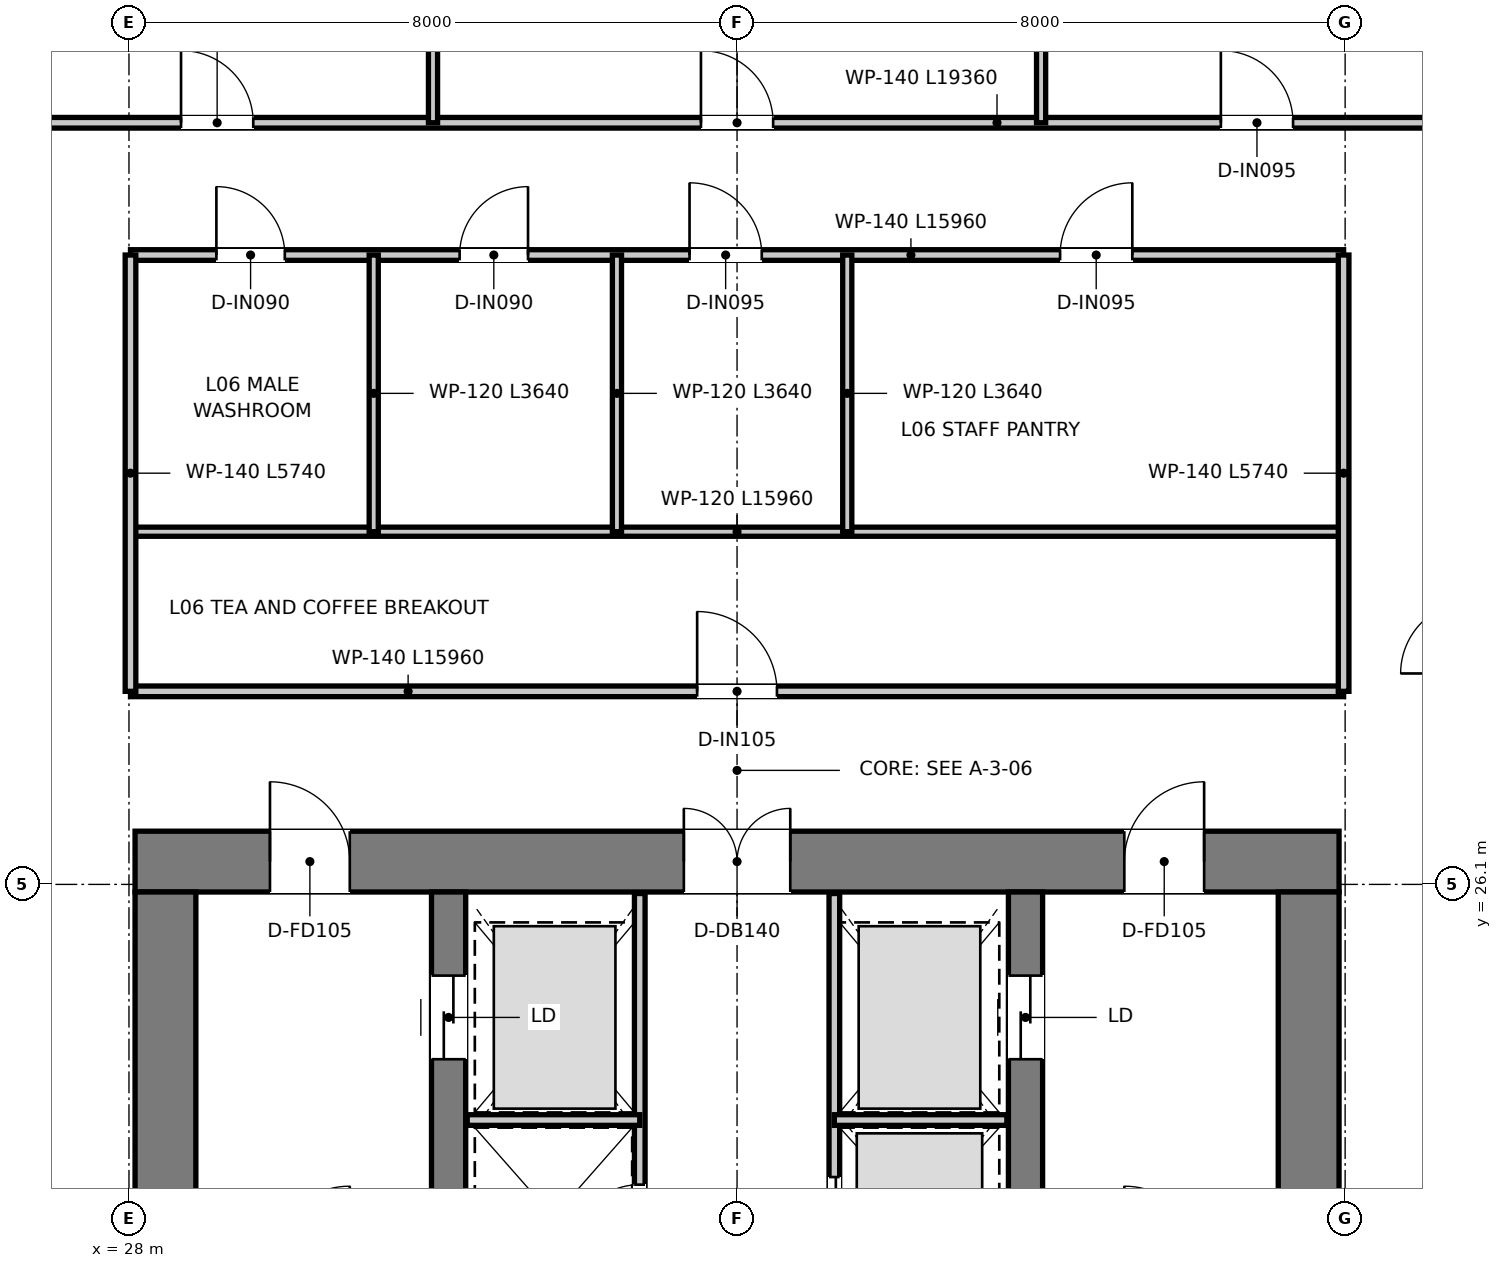
"""IFC4 building model, lengths in metres.
Left out: names, types, materials, properties, quantities, classifications, styles, units other than length and angle.
Written with IfcOpenShell. Run it as: python <this file> out.ifc"""

import sys

from ifc_helpers import new_model, si_unit, direction, frame, frame_2d, origin, place, context, subcontext, project, spatial, rectangle, extrude, element, fill, save


model = new_model("IFC4")
c1 = context("Model", 3, precision=1e-05, world=origin(), true_north=direction((0.0, 1.0)))
c2 = subcontext(c1, "Body", "Model", "MODEL_VIEW")
j1 = project(units=[si_unit("LENGTHUNIT", "METRE"), si_unit("PLANEANGLEUNIT", "RADIAN")], contexts=[c1])
p1 = place(None, origin())
s1 = spatial("IfcSite", under=j1, at=p1, CompositionType="ELEMENT")
p2 = place(p1, origin())
s2 = spatial("IfcBuilding", under=s1, at=p2, CompositionType="ELEMENT")
p3 = place(p2, frame((0.0, 0.0, 28.95)))
s3 = spatial("IfcBuildingStorey", under=s2, at=p3, CompositionType="ELEMENT", Elevation=28.95)
p4 = place(p3, frame((28.08, 26.4, 0.0), z_axis=(0.0, 0.0, 1.0), x_axis=(1.0, 0.0, 0.0)))
e1 = element("IfcWall", 1, at=p4, inside=s3, PredefinedType="SHEAR", context=c2, shape_type="SweptSolid", body=[
    extrude(rectangle(XDim=15.84, YDim=0.8, at=frame_2d((7.92, 0.0))), origin(), (0.0, 0.0, 1.0), 3.95),
])
p5 = place(p4, frame((7.22, 0.0, 0.0)))
e2 = element("IfcOpeningElement", 2, at=p5, cuts=e1, PredefinedType="OPENING", context=c2, shape_type="SweptSolid", body=[
    extrude(rectangle(XDim=1.4, YDim=2.2, at=frame_2d((0.7, 1.1))), frame((0.0, 0.41, 0.0), z_axis=(0.0, -1.0, 0.0), x_axis=(1.0, 0.0, 0.0)), (0.0, 0.0, 1.0), 0.82),
])
p6 = place(p4, frame((1.775, 0.0, 0.0)))
e3 = element("IfcOpeningElement", 3, at=p6, cuts=e1, PredefinedType="OPENING", context=c2, shape_type="SweptSolid", body=[
    extrude(rectangle(XDim=1.05, YDim=2.1, at=frame_2d((0.525, 1.05))), frame((0.0, 0.41, 0.0), z_axis=(0.0, -1.0, 0.0), x_axis=(1.0, 0.0, 0.0)), (0.0, 0.0, 1.0), 0.82),
])
p7 = place(p4, frame((13.015, 0.0, 0.0)))
e4 = element("IfcOpeningElement", 4, at=p7, cuts=e1, PredefinedType="OPENING", context=c2, shape_type="SweptSolid", body=[
    extrude(rectangle(XDim=1.05, YDim=2.1, at=frame_2d((0.525, 1.05))), frame((0.0, 0.41, 0.0), z_axis=(0.0, -1.0, 0.0), x_axis=(1.0, 0.0, 0.0)), (0.0, 0.0, 1.0), 0.82),
])
for number, where, z_axis, x_axis in (
    (5, (28.48, 11.3, 0.0), (0.0, 0.0, 1.0), (0.0, 1.0, 0.0)),
    (6, (43.52, 11.3, 0.0), (0.0, 0.0, 1.0), (0.0, 1.0, 0.0)),
):
    element("IfcWall", number, at=place(p3, frame(where, z_axis=z_axis, x_axis=x_axis)), inside=s3, PredefinedType="SHEAR", context=c2, shape_type="SweptSolid", body=[
        extrude(rectangle(XDim=14.7, YDim=0.8, at=frame_2d((7.35, 0.0))), origin(), (0.0, 0.0, 1.0), 3.95),
    ])
p8 = place(p3, frame((32.205, 13.22, 0.0), z_axis=(0.0, 0.0, 1.0), x_axis=(0.0, 1.0, 0.0)))
e7 = element("IfcWall", 7, at=p8, inside=s3, PredefinedType="SHEAR", context=c2, shape_type="SweptSolid", body=[
    extrude(rectangle(XDim=12.78, YDim=0.45, at=frame_2d((6.39, 0.0))), origin(), (0.0, 0.0, 1.0), 3.95),
])
p9 = place(p8, frame((10.58, 0.0, 0.0)))
e8 = element("IfcOpeningElement", 8, at=p9, cuts=e7, PredefinedType="OPENING", context=c2, shape_type="SweptSolid", body=[
    extrude(rectangle(XDim=1.1, YDim=2.15, at=frame_2d((0.55, 1.075))), frame((0.0, 0.235, 0.0), z_axis=(0.0, -1.0, 0.0), x_axis=(1.0, 0.0, 0.0)), (0.0, 0.0, 1.0), 0.47),
])
p10 = place(p3, frame((39.795, 13.22, 0.0), z_axis=(0.0, 0.0, 1.0), x_axis=(0.0, 1.0, 0.0)))
e9 = element("IfcWall", 9, at=p10, inside=s3, PredefinedType="SHEAR", context=c2, shape_type="SweptSolid", body=[
    extrude(rectangle(XDim=12.78, YDim=0.45, at=frame_2d((6.39, 0.0))), origin(), (0.0, 0.0, 1.0), 3.95),
])
p11 = place(p10, frame((10.58, 0.0, 0.0)))
e10 = element("IfcOpeningElement", 10, at=p11, cuts=e9, PredefinedType="OPENING", context=c2, shape_type="SweptSolid", body=[
    extrude(rectangle(XDim=1.1, YDim=2.15, at=frame_2d((0.55, 1.075))), frame((0.0, 0.235, 0.0), z_axis=(0.0, -1.0, 0.0), x_axis=(1.0, 0.0, 0.0)), (0.0, 0.0, 1.0), 0.47),
])
p12 = place(p3, frame((34.72, 20.2, 0.0), z_axis=(0.0, 0.0, 1.0), x_axis=(0.0, 1.0, 0.0)))
e11 = element("IfcWall", 11, at=p12, inside=s3, PredefinedType="PARTITIONING", context=c2, shape_type="SweptSolid", body=[
    extrude(rectangle(XDim=5.78, YDim=0.14, at=frame_2d((2.89, 0.0))), origin(), (0.0, 0.0, 1.0), 2.47),
])
p13 = place(p12, frame((1.05, 0.0, 0.0)))
e12 = element("IfcOpeningElement", 12, at=p13, cuts=e11, PredefinedType="OPENING", context=c2, shape_type="SweptSolid", body=[
    extrude(rectangle(XDim=0.9, YDim=2.1, at=frame_2d((0.45, 1.05))), frame((0.0, 0.08, 0.0), z_axis=(0.0, -1.0, 0.0), x_axis=(1.0, 0.0, 0.0)), (0.0, 0.0, 1.0), 0.16),
])
p14 = place(p3, frame((37.28, 20.2, 0.0), z_axis=(0.0, 0.0, 1.0), x_axis=(0.0, 1.0, 0.0)))
e13 = element("IfcWall", 13, at=p14, inside=s3, PredefinedType="PARTITIONING", context=c2, shape_type="SweptSolid", body=[
    extrude(rectangle(XDim=5.78, YDim=0.14, at=frame_2d((2.89, 0.0))), origin(), (0.0, 0.0, 1.0), 2.47),
])
p15 = place(p14, frame((0.95, 0.0, 0.0)))
e14 = element("IfcOpeningElement", 14, at=p15, cuts=e13, PredefinedType="OPENING", context=c2, shape_type="SweptSolid", body=[
    extrude(rectangle(XDim=1.1, YDim=2.15, at=frame_2d((0.55, 1.075))), frame((0.0, 0.08, 0.0), z_axis=(0.0, -1.0, 0.0), x_axis=(1.0, 0.0, 0.0)), (0.0, 0.0, 1.0), 0.16),
])
for number, where, z_axis, x_axis in (
    (15, (32.45, 23.0, 0.0), (0.0, 0.0, 1.0), (1.0, 0.0, 0.0)),
    (16, (37.28, 23.0, 0.0), (0.0, 0.0, 1.0), (1.0, 0.0, 0.0)),
):
    element("IfcWall", number, at=place(p3, frame(where, z_axis=z_axis, x_axis=x_axis)), inside=s3, PredefinedType="PARTITIONING", context=c2, shape_type="SweptSolid", body=[
        extrude(rectangle(XDim=2.27, YDim=0.14, at=frame_2d((1.135, 0.0))), origin(), (0.0, 0.0, 1.0), 2.47),
    ])
p16 = place(p3, frame((28.02, 28.64, 0.0), z_axis=(0.0, 0.0, 1.0), x_axis=(1.0, 0.0, 0.0)))
e17 = element("IfcWall", 17, at=p16, inside=s3, PredefinedType="PARTITIONING", context=c2, shape_type="SweptSolid", body=[
    extrude(rectangle(XDim=15.96, YDim=0.14, at=frame_2d((7.98, 0.0))), origin(), (0.0, 0.0, 1.0), 3.08),
])
p17 = place(p16, frame((7.455, 0.0, 0.0)))
e18 = element("IfcOpeningElement", 18, at=p17, cuts=e17, PredefinedType="OPENING", context=c2, shape_type="SweptSolid", body=[
    extrude(rectangle(XDim=1.05, YDim=2.15, at=frame_2d((0.525, 1.075))), frame((0.0, 0.08, 0.0), z_axis=(0.0, -1.0, 0.0), x_axis=(1.0, 0.0, 0.0)), (0.0, 0.0, 1.0), 0.16),
])
p18 = place(p3, frame((28.02, 30.74, 0.0), z_axis=(0.0, 0.0, 1.0), x_axis=(1.0, 0.0, 0.0)))
e19 = element("IfcWall", 19, at=p18, inside=s3, PredefinedType="PARTITIONING", context=c2, shape_type="SweptSolid", body=[
    extrude(rectangle(XDim=15.96, YDim=0.12, at=frame_2d((7.98, 0.0))), origin(), (0.0, 0.0, 1.0), 3.08),
])
p19 = place(p3, frame((28.02, 34.38, 0.0), z_axis=(0.0, 0.0, 1.0), x_axis=(1.0, 0.0, 0.0)))
e20 = element("IfcWall", 20, at=p19, inside=s3, PredefinedType="PARTITIONING", context=c2, shape_type="SweptSolid", body=[
    extrude(rectangle(XDim=15.96, YDim=0.14, at=frame_2d((7.98, 0.0))), origin(), (0.0, 0.0, 1.0), 3.08),
])
p20 = place(p19, frame((1.13, 0.0, 0.0)))
e21 = element("IfcOpeningElement", 21, at=p20, cuts=e20, PredefinedType="OPENING", context=c2, shape_type="SweptSolid", body=[
    extrude(rectangle(XDim=0.9, YDim=2.1, at=frame_2d((0.45, 1.05))), frame((0.0, 0.08, 0.0), z_axis=(0.0, -1.0, 0.0), x_axis=(1.0, 0.0, 0.0)), (0.0, 0.0, 1.0), 0.16),
])
p21 = place(p19, frame((4.33, 0.0, 0.0)))
e22 = element("IfcOpeningElement", 22, at=p21, cuts=e20, PredefinedType="OPENING", context=c2, shape_type="SweptSolid", body=[
    extrude(rectangle(XDim=0.9, YDim=2.1, at=frame_2d((0.45, 1.05))), frame((0.0, 0.08, 0.0), z_axis=(0.0, -1.0, 0.0), x_axis=(1.0, 0.0, 0.0)), (0.0, 0.0, 1.0), 0.16),
])
p22 = place(p19, frame((7.355, 0.0, 0.0)))
e23 = element("IfcOpeningElement", 23, at=p22, cuts=e20, PredefinedType="OPENING", context=c2, shape_type="SweptSolid", body=[
    extrude(rectangle(XDim=0.95, YDim=2.1, at=frame_2d((0.475, 1.05))), frame((0.0, 0.08, 0.0), z_axis=(0.0, -1.0, 0.0), x_axis=(1.0, 0.0, 0.0)), (0.0, 0.0, 1.0), 0.16),
])
p23 = place(p19, frame((12.23, 0.0, 0.0)))
e24 = element("IfcOpeningElement", 24, at=p23, cuts=e20, PredefinedType="OPENING", context=c2, shape_type="SweptSolid", body=[
    extrude(rectangle(XDim=0.95, YDim=2.1, at=frame_2d((0.475, 1.05))), frame((0.0, 0.08, 0.0), z_axis=(0.0, -1.0, 0.0), x_axis=(1.0, 0.0, 0.0)), (0.0, 0.0, 1.0), 0.16),
])
for number, where, z_axis, x_axis in (
    (25, (28.02, 28.64, 0.0), (0.0, 0.0, 1.0), (0.0, 1.0, 0.0)),
    (26, (43.98, 28.64, 0.0), (0.0, 0.0, 1.0), (0.0, 1.0, 0.0)),
):
    element("IfcWall", number, at=place(p3, frame(where, z_axis=z_axis, x_axis=x_axis)), inside=s3, PredefinedType="PARTITIONING", context=c2, shape_type="SweptSolid", body=[
        extrude(rectangle(XDim=5.74, YDim=0.14, at=frame_2d((2.87, 0.0))), origin(), (0.0, 0.0, 1.0), 3.22),
    ])
for number, where, z_axis, x_axis in (
    (27, (31.22, 30.74, 0.0), (0.0, 0.0, 1.0), (0.0, 1.0, 0.0)),
    (28, (34.42, 30.74, 0.0), (0.0, 0.0, 1.0), (0.0, 1.0, 0.0)),
    (29, (37.45, 30.74, 0.0), (0.0, 0.0, 1.0), (0.0, 1.0, 0.0)),
):
    element("IfcWall", number, at=place(p3, frame(where, z_axis=z_axis, x_axis=x_axis)), inside=s3, PredefinedType="PARTITIONING", context=c2, shape_type="SweptSolid", body=[
        extrude(rectangle(XDim=3.64, YDim=0.12, at=frame_2d((1.82, 0.0))), origin(), (0.0, 0.0, 1.0), 3.12),
    ])
p24 = place(p3, frame((26.32, 36.12, 0.0), z_axis=(0.0, 0.0, 1.0), x_axis=(1.0, 0.0, 0.0)))
e30 = element("IfcWall", 30, at=p24, inside=s3, PredefinedType="PARTITIONING", context=c2, shape_type="SweptSolid", body=[
    extrude(rectangle(XDim=19.36, YDim=0.14, at=frame_2d((9.68, 0.0))), origin(), (0.0, 0.0, 1.0), 3.08),
])
p25 = place(p24, frame((2.365, 0.0, 0.0)))
e31 = element("IfcOpeningElement", 31, at=p25, cuts=e30, PredefinedType="OPENING", context=c2, shape_type="SweptSolid", body=[
    extrude(rectangle(XDim=0.95, YDim=2.1, at=frame_2d((0.475, 1.05))), frame((0.0, 0.08, 0.0), z_axis=(0.0, -1.0, 0.0), x_axis=(1.0, 0.0, 0.0)), (0.0, 0.0, 1.0), 0.16),
])
p26 = place(p24, frame((9.205, 0.0, 0.0)))
e32 = element("IfcOpeningElement", 32, at=p26, cuts=e30, PredefinedType="OPENING", context=c2, shape_type="SweptSolid", body=[
    extrude(rectangle(XDim=0.95, YDim=2.1, at=frame_2d((0.475, 1.05))), frame((0.0, 0.08, 0.0), z_axis=(0.0, -1.0, 0.0), x_axis=(1.0, 0.0, 0.0)), (0.0, 0.0, 1.0), 0.16),
])
p27 = place(p24, frame((16.045, 0.0, 0.0)))
e33 = element("IfcOpeningElement", 33, at=p27, cuts=e30, PredefinedType="OPENING", context=c2, shape_type="SweptSolid", body=[
    extrude(rectangle(XDim=0.95, YDim=2.1, at=frame_2d((0.475, 1.05))), frame((0.0, 0.08, 0.0), z_axis=(0.0, -1.0, 0.0), x_axis=(1.0, 0.0, 0.0)), (0.0, 0.0, 1.0), 0.16),
])
for number, where, z_axis, x_axis in (
    (34, (32.0, 36.12, 0.0), (0.0, 0.0, 1.0), (0.0, 1.0, 0.0)),
    (35, (40.0, 36.12, 0.0), (0.0, 0.0, 1.0), (0.0, 1.0, 0.0)),
):
    element("IfcWall", number, at=place(p3, frame(where, z_axis=z_axis, x_axis=x_axis)), inside=s3, PredefinedType="PARTITIONING", context=c2, shape_type="SweptSolid", body=[
        extrude(rectangle(XDim=15.49, YDim=0.12, at=frame_2d((7.745, 0.0))), origin(), (0.0, 0.0, 1.0), 2.97),
    ])
p28 = place(p5, origin())
e36 = element("IfcDoor", 36, at=p28, inside=s3, OperationType="DOUBLE_DOOR_SINGLE_SWING", PredefinedType="DOOR", context=c2, shape_type="SweptSolid", body=[
    extrude(rectangle(XDim=1.4, YDim=2.2, at=frame_2d((0.7, 1.1))), frame((0.0, 0.025, 0.0), z_axis=(0.0, -1.0, 0.0), x_axis=(1.0, 0.0, 0.0)), (0.0, 0.0, 1.0), 0.05),
])
fill(e2, e36)
p29 = place(p6, origin())
e37 = element("IfcDoor", 37, at=p29, inside=s3, OperationType="SINGLE_SWING_LEFT", PredefinedType="DOOR", context=c2, shape_type="SweptSolid", body=[
    extrude(rectangle(XDim=1.05, YDim=2.1, at=frame_2d((0.525, 1.05))), frame((0.0, 0.025, 0.0), z_axis=(0.0, -1.0, 0.0), x_axis=(1.0, 0.0, 0.0)), (0.0, 0.0, 1.0), 0.05),
])
fill(e3, e37)
p30 = place(p7, origin())
e38 = element("IfcDoor", 38, at=p30, inside=s3, OperationType="SINGLE_SWING_RIGHT", PredefinedType="DOOR", context=c2, shape_type="SweptSolid", body=[
    extrude(rectangle(XDim=1.05, YDim=2.1, at=frame_2d((0.525, 1.05))), frame((0.0, 0.025, 0.0), z_axis=(0.0, -1.0, 0.0), x_axis=(1.0, 0.0, 0.0)), (0.0, 0.0, 1.0), 0.05),
])
fill(e4, e38)
p31 = place(p9, origin())
e39 = element("IfcDoor", 39, at=p31, inside=s3, OperationType="DOUBLE_DOOR_SLIDING", PredefinedType="DOOR", context=c2, shape_type="SweptSolid", body=[
    extrude(rectangle(XDim=1.1, YDim=2.15, at=frame_2d((0.55, 1.075))), frame((0.0, 0.025, 0.0), z_axis=(0.0, -1.0, 0.0), x_axis=(1.0, 0.0, 0.0)), (0.0, 0.0, 1.0), 0.05),
])
fill(e8, e39)
p32 = place(p11, origin())
e40 = element("IfcDoor", 40, at=p32, inside=s3, OperationType="DOUBLE_DOOR_SLIDING", PredefinedType="DOOR", context=c2, shape_type="SweptSolid", body=[
    extrude(rectangle(XDim=1.1, YDim=2.15, at=frame_2d((0.55, 1.075))), frame((0.0, 0.025, 0.0), z_axis=(0.0, -1.0, 0.0), x_axis=(1.0, 0.0, 0.0)), (0.0, 0.0, 1.0), 0.05),
])
fill(e10, e40)
p33 = place(p13, origin())
e41 = element("IfcDoor", 41, at=p33, inside=s3, OperationType="SINGLE_SWING_LEFT", PredefinedType="DOOR", context=c2, shape_type="SweptSolid", body=[
    extrude(rectangle(XDim=0.9, YDim=2.1, at=frame_2d((0.45, 1.05))), frame((0.0, 0.025, 0.0), z_axis=(0.0, -1.0, 0.0), x_axis=(1.0, 0.0, 0.0)), (0.0, 0.0, 1.0), 0.05),
])
fill(e12, e41)
p34 = place(p15, origin())
e42 = element("IfcDoor", 42, at=p34, inside=s3, OperationType="DOUBLE_DOOR_SLIDING", PredefinedType="DOOR", context=c2, shape_type="SweptSolid", body=[
    extrude(rectangle(XDim=1.1, YDim=2.15, at=frame_2d((0.55, 1.075))), frame((0.0, 0.025, 0.0), z_axis=(0.0, -1.0, 0.0), x_axis=(1.0, 0.0, 0.0)), (0.0, 0.0, 1.0), 0.05),
])
fill(e14, e42)
p35 = place(p17, origin())
e43 = element("IfcDoor", 43, at=p35, inside=s3, OperationType="SINGLE_SWING_LEFT", PredefinedType="DOOR", context=c2, shape_type="SweptSolid", body=[
    extrude(rectangle(XDim=1.05, YDim=2.15, at=frame_2d((0.525, 1.075))), frame((0.0, 0.025, 0.0), z_axis=(0.0, -1.0, 0.0), x_axis=(1.0, 0.0, 0.0)), (0.0, 0.0, 1.0), 0.05),
])
fill(e18, e43)
p36 = place(p20, origin())
e44 = element("IfcDoor", 44, at=p36, inside=s3, OperationType="SINGLE_SWING_LEFT", PredefinedType="DOOR", context=c2, shape_type="SweptSolid", body=[
    extrude(rectangle(XDim=0.9, YDim=2.1, at=frame_2d((0.45, 1.05))), frame((0.0, 0.025, 0.0), z_axis=(0.0, -1.0, 0.0), x_axis=(1.0, 0.0, 0.0)), (0.0, 0.0, 1.0), 0.05),
])
fill(e21, e44)
p37 = place(p21, origin())
e45 = element("IfcDoor", 45, at=p37, inside=s3, OperationType="SINGLE_SWING_RIGHT", PredefinedType="DOOR", context=c2, shape_type="SweptSolid", body=[
    extrude(rectangle(XDim=0.9, YDim=2.1, at=frame_2d((0.45, 1.05))), frame((0.0, 0.025, 0.0), z_axis=(0.0, -1.0, 0.0), x_axis=(1.0, 0.0, 0.0)), (0.0, 0.0, 1.0), 0.05),
])
fill(e22, e45)
p38 = place(p22, origin())
e46 = element("IfcDoor", 46, at=p38, inside=s3, OperationType="SINGLE_SWING_LEFT", PredefinedType="DOOR", context=c2, shape_type="SweptSolid", body=[
    extrude(rectangle(XDim=0.95, YDim=2.1, at=frame_2d((0.475, 1.05))), frame((0.0, 0.025, 0.0), z_axis=(0.0, -1.0, 0.0), x_axis=(1.0, 0.0, 0.0)), (0.0, 0.0, 1.0), 0.05),
])
fill(e23, e46)
p39 = place(p23, origin())
e47 = element("IfcDoor", 47, at=p39, inside=s3, OperationType="SINGLE_SWING_RIGHT", PredefinedType="DOOR", context=c2, shape_type="SweptSolid", body=[
    extrude(rectangle(XDim=0.95, YDim=2.1, at=frame_2d((0.475, 1.05))), frame((0.0, 0.025, 0.0), z_axis=(0.0, -1.0, 0.0), x_axis=(1.0, 0.0, 0.0)), (0.0, 0.0, 1.0), 0.05),
])
fill(e24, e47)
p40 = place(p25, origin())
e48 = element("IfcDoor", 48, at=p40, inside=s3, OperationType="SINGLE_SWING_LEFT", PredefinedType="DOOR", context=c2, shape_type="SweptSolid", body=[
    extrude(rectangle(XDim=0.95, YDim=2.1, at=frame_2d((0.475, 1.05))), frame((0.0, 0.025, 0.0), z_axis=(0.0, -1.0, 0.0), x_axis=(1.0, 0.0, 0.0)), (0.0, 0.0, 1.0), 0.05),
])
fill(e31, e48)
p41 = place(p26, origin())
e49 = element("IfcDoor", 49, at=p41, inside=s3, OperationType="SINGLE_SWING_LEFT", PredefinedType="DOOR", context=c2, shape_type="SweptSolid", body=[
    extrude(rectangle(XDim=0.95, YDim=2.1, at=frame_2d((0.475, 1.05))), frame((0.0, 0.025, 0.0), z_axis=(0.0, -1.0, 0.0), x_axis=(1.0, 0.0, 0.0)), (0.0, 0.0, 1.0), 0.05),
])
fill(e32, e49)
p42 = place(p27, origin())
e50 = element("IfcDoor", 50, at=p42, inside=s3, OperationType="SINGLE_SWING_LEFT", PredefinedType="DOOR", context=c2, shape_type="SweptSolid", body=[
    extrude(rectangle(XDim=0.95, YDim=2.1, at=frame_2d((0.475, 1.05))), frame((0.0, 0.025, 0.0), z_axis=(0.0, -1.0, 0.0), x_axis=(1.0, 0.0, 0.0)), (0.0, 0.0, 1.0), 0.05),
])
fill(e33, e50)
save(model, sys.argv[1])
